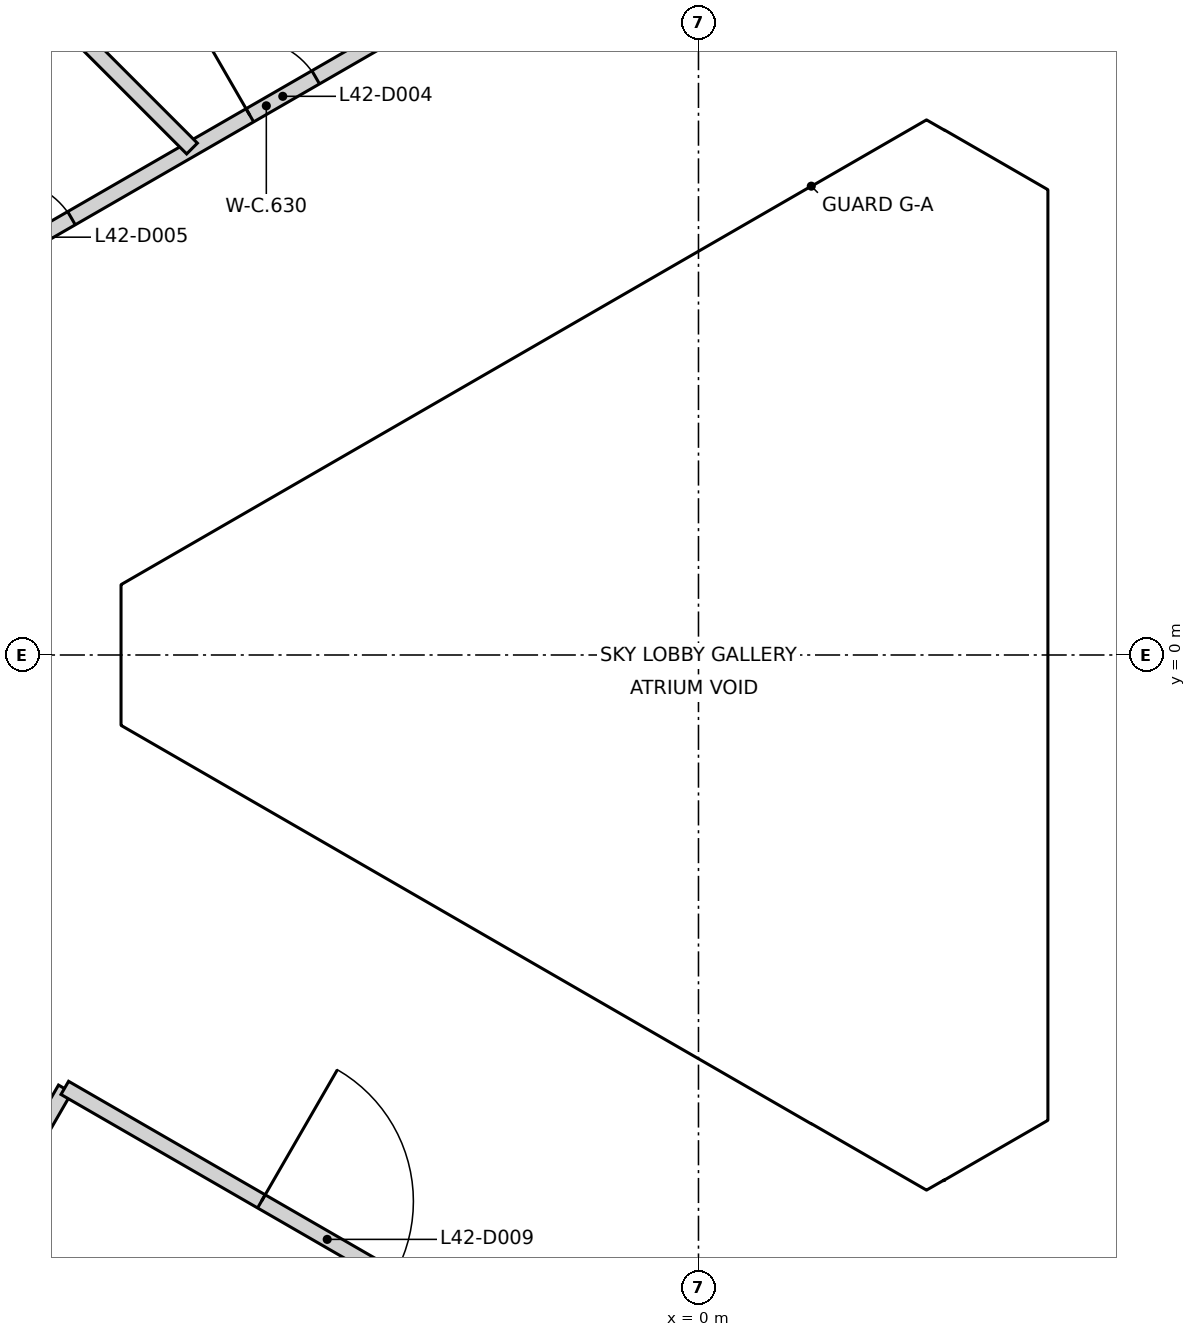
"""IFC4 building model, lengths in metres.
Left out: names, types, materials, properties, quantities, classifications, styles, units other than length and angle.
Written with IfcOpenShell. Run it as: python <this file> out.ifc"""

import sys

from ifc_helpers import new_model, si_unit, direction, frame, frame_2d, origin, origin_2d, place, context, subcontext, project, spatial, rectangle, extrude, element, fill, save


model = new_model("IFC4")
c1 = context("Model", 3, precision=1e-05, world=origin(), true_north=direction((0.0, 1.0)))
c2 = subcontext(c1, "Body", "Model", "MODEL_VIEW")
j1 = project(units=[si_unit("LENGTHUNIT", "METRE"), si_unit("PLANEANGLEUNIT", "RADIAN")], contexts=[c1])
p1 = place(None, origin())
s1 = spatial("IfcSite", under=j1, at=p1, CompositionType="ELEMENT")
p2 = place(p1, origin())
s2 = spatial("IfcBuilding", under=s1, at=p2, CompositionType="ELEMENT")
p3 = place(p2, frame((0.0, 0.0, 169.6)))
s3 = spatial("IfcBuildingStorey", under=s2, at=p3, CompositionType="ELEMENT", Elevation=169.6)
p4 = place(p3, frame((10.42, 6.498, 0.0), z_axis=(0.0, 0.0, 1.0), x_axis=(-0.866021906294, 0.500006057782, 0.0)))
e1 = element("IfcWall", 1, at=p4, inside=s3, PredefinedType="SHEAR", context=c2, shape_type="SweptSolid", body=[
    extrude(rectangle(XDim=11.55, YDim=0.25, at=frame_2d((5.775, 0.0))), origin(), (0.0, 0.0, 1.0), 5.65),
])
p5 = place(p4, frame((10.025, 0.0, 0.0)))
e2 = element("IfcOpeningElement", 2, at=p5, cuts=e1, PredefinedType="OPENING", context=c2, shape_type="SweptSolid", body=[
    extrude(rectangle(XDim=1.2, YDim=2.1, at=frame_2d((0.6, 1.05))), frame((0.0, 0.135, 0.0), z_axis=(0.0, -1.0, 0.0), x_axis=(1.0, 0.0, 0.0)), (0.0, 0.0, 1.0), 0.27),
])
p6 = place(p4, frame((8.725, 0.0, 0.0)))
e3 = element("IfcOpeningElement", 3, at=p6, cuts=e1, PredefinedType="OPENING", context=c2, shape_type="SweptSolid", body=[
    extrude(rectangle(XDim=1.2, YDim=2.1, at=frame_2d((0.6, 1.05))), frame((0.0, 0.135, 0.0), z_axis=(0.0, -1.0, 0.0), x_axis=(1.0, 0.0, 0.0)), (0.0, 0.0, 1.0), 0.27),
])
p7 = place(p3, frame((0.417, -12.273, 0.0), z_axis=(0.0, 0.0, 1.0), x_axis=(0.866021906294, 0.500006057782, 0.0)))
e4 = element("IfcWall", 4, at=p7, inside=s3, PredefinedType="SHEAR", context=c2, shape_type="SweptSolid", body=[
    extrude(rectangle(XDim=11.55, YDim=0.25, at=frame_2d((5.775, 0.0))), origin(), (0.0, 0.0, 1.0), 5.65),
])
p8 = place(p7, frame((10.025, 0.0, 0.0)))
e5 = element("IfcOpeningElement", 5, at=p8, cuts=e4, PredefinedType="OPENING", context=c2, shape_type="SweptSolid", body=[
    extrude(rectangle(XDim=1.2, YDim=2.1, at=frame_2d((0.6, 1.05))), frame((0.0, 0.135, 0.0), z_axis=(0.0, -1.0, 0.0), x_axis=(1.0, 0.0, 0.0)), (0.0, 0.0, 1.0), 0.27),
])
p9 = place(p7, frame((8.725, 0.0, 0.0)))
e6 = element("IfcOpeningElement", 6, at=p9, cuts=e4, PredefinedType="OPENING", context=c2, shape_type="SweptSolid", body=[
    extrude(rectangle(XDim=1.2, YDim=2.1, at=frame_2d((0.6, 1.05))), frame((0.0, 0.135, 0.0), z_axis=(0.0, -1.0, 0.0), x_axis=(1.0, 0.0, 0.0)), (0.0, 0.0, 1.0), 0.27),
])
p10 = place(p3, frame((-10.652, 4.36, 0.0), z_axis=(0.0, 0.0, 1.0), x_axis=(0.866215711467, 0.499670232461, 0.0)))
e7 = element("IfcWall", 7, at=p10, inside=s3, PredefinedType="PARTITIONING", context=c2, shape_type="SweptSolid", body=[
    extrude(rectangle(XDim=11.468, YDim=0.2, at=frame_2d((5.734, 0.0))), origin(), (0.0, 0.0, 1.0), 5.65),
])
p11 = place(p10, frame((5.484, 0.0, 0.0)))
e8 = element("IfcOpeningElement", 8, at=p11, cuts=e7, PredefinedType="OPENING", context=c2, shape_type="SweptSolid", body=[
    extrude(rectangle(XDim=1.0, YDim=2.1, at=frame_2d((0.5, 1.05))), frame((0.0, 0.11, 0.0), z_axis=(0.0, -1.0, 0.0), x_axis=(1.0, 0.0, 0.0)), (0.0, 0.0, 1.0), 0.22),
])
p12 = place(p10, frame((1.775, 0.0, 0.0)))
e9 = element("IfcOpeningElement", 9, at=p12, cuts=e7, PredefinedType="OPENING", context=c2, shape_type="SweptSolid", body=[
    extrude(rectangle(XDim=1.0, YDim=2.1, at=frame_2d((0.5, 1.05))), frame((0.0, 0.11, 0.0), z_axis=(0.0, -1.0, 0.0), x_axis=(1.0, 0.0, 0.0)), (0.0, 0.0, 1.0), 0.22),
])
p13 = place(p3, frame((-9.441, -7.629, 0.0), z_axis=(0.0, 0.0, 1.0), x_axis=(0.499620784327, 0.866244233382, 0.0)))
e10 = element("IfcWall", 10, at=p13, inside=s3, PredefinedType="PARTITIONING", context=c2, shape_type="SweptSolid", body=[
    extrude(rectangle(XDim=2.218, YDim=0.2, at=frame_2d((1.109, 0.0))), origin(), (0.0, 0.0, 1.0), 5.65),
])
p14 = place(p3, frame((-8.337, -5.695, 0.0), z_axis=(0.0, 0.0, 1.0), x_axis=(0.86605990967, -0.499940229289, 0.0)))
e11 = element("IfcWall", 11, at=p14, inside=s3, PredefinedType="PARTITIONING", context=c2, shape_type="SweptSolid", body=[
    extrude(rectangle(XDim=11.419, YDim=0.2, at=frame_2d((5.709, 0.0))), origin(), (0.0, 0.0, 1.0), 5.65),
])
p15 = place(p14, frame((2.987, 0.0, 0.0)))
e12 = element("IfcOpeningElement", 12, at=p15, cuts=e11, PredefinedType="OPENING", context=c2, shape_type="SweptSolid", body=[
    extrude(rectangle(XDim=2.0, YDim=2.1, at=frame_2d((1.0, 1.05))), frame((0.0, 0.11, 0.0), z_axis=(0.0, -1.0, 0.0), x_axis=(1.0, 0.0, 0.0)), (0.0, 0.0, 1.0), 0.22),
])
p16 = place(p14, frame((9.219, 0.0, 0.0)))
e13 = element("IfcOpeningElement", 13, at=p16, cuts=e11, PredefinedType="OPENING", context=c2, shape_type="SweptSolid", body=[
    extrude(rectangle(XDim=1.0, YDim=2.1, at=frame_2d((0.5, 1.05))), frame((0.0, 0.11, 0.0), z_axis=(0.0, -1.0, 0.0), x_axis=(1.0, 0.0, 0.0)), (0.0, 0.0, 1.0), 0.22),
])
p17 = place(p3, frame((-13.905, 13.905, 0.0), z_axis=(0.0, 0.0, 1.0), x_axis=(0.707106781187, -0.707106781187, 0.0)))
e14 = element("IfcWall", 14, at=p17, inside=s3, PredefinedType="PARTITIONING", context=c2, shape_type="SweptSolid", body=[
    extrude(rectangle(XDim=10.241, YDim=0.2, at=frame_2d((5.121, 0.0))), origin(), (0.0, 0.0, 1.0), 4.75),
])
p18 = place(p3, frame((0.0, 0.0, -0.35)))
p19 = place(p18, origin())
p20 = place(p19, frame((0.0, 0.0, 0.3)))
e15 = element("IfcWindow", 15, at=p20, inside=s3, PartitioningType="SINGLE_PANEL", PredefinedType="SKYLIGHT", context=c2, shape_type="SweptSolid", body=[
    extrude(rectangle(XDim=7.95, YDim=4.96, at=origin_2d()), origin(), (0.0, 0.0, 1.0), 0.05),
])
p21 = place(p11, origin())
e16 = element("IfcDoor", 16, at=p21, inside=s3, OperationType="SINGLE_SWING_LEFT", PredefinedType="DOOR", context=c2, shape_type="SweptSolid", body=[
    extrude(rectangle(XDim=1.0, YDim=2.1, at=frame_2d((0.5, 1.05))), frame((0.0, 0.025, 0.0), z_axis=(0.0, -1.0, 0.0), x_axis=(1.0, 0.0, 0.0)), (0.0, 0.0, 1.0), 0.05),
])
fill(e8, e16)
p22 = place(p12, origin())
e17 = element("IfcDoor", 17, at=p22, inside=s3, OperationType="SINGLE_SWING_LEFT", PredefinedType="DOOR", context=c2, shape_type="SweptSolid", body=[
    extrude(rectangle(XDim=1.0, YDim=2.1, at=frame_2d((0.5, 1.05))), frame((0.0, 0.025, 0.0), z_axis=(0.0, -1.0, 0.0), x_axis=(1.0, 0.0, 0.0)), (0.0, 0.0, 1.0), 0.05),
])
fill(e9, e17)
p23 = place(p15, frame((2.0, 0.0, 0.0), z_axis=(0.0, 0.0, 1.0), x_axis=(-1.0, 0.0, 0.0)))
e18 = element("IfcDoor", 18, at=p23, inside=s3, OperationType="DOUBLE_DOOR_SINGLE_SWING", PredefinedType="DOOR", context=c2, shape_type="SweptSolid", body=[
    extrude(rectangle(XDim=2.0, YDim=2.1, at=frame_2d((1.0, 1.05))), frame((0.0, 0.025, 0.0), z_axis=(0.0, -1.0, 0.0), x_axis=(1.0, 0.0, 0.0)), (0.0, 0.0, 1.0), 0.05),
])
fill(e12, e18)
save(model, sys.argv[1])
